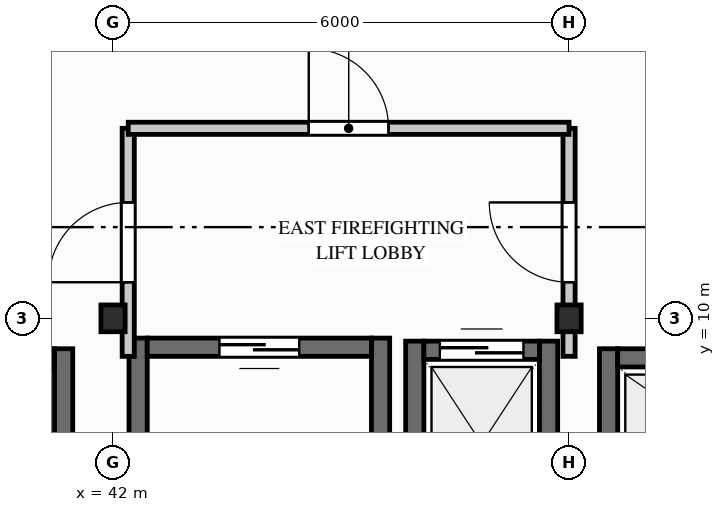
"""IFC4 building model, lengths in metres.
Left out: names, types, materials, properties, quantities, classifications, styles, units other than length and angle.
Written with IfcOpenShell. Run it as: python <this file> out.ifc"""

import sys

from ifc_helpers import new_model, si_unit, direction, frame, frame_2d, origin, origin_2d, place, context, subcontext, project, spatial, rectangle, i_section, extrude, element, fill, save


model = new_model("IFC4")
c1 = context("Model", 3, precision=1e-05, world=origin(), true_north=direction((0.0, 1.0)))
c2 = subcontext(c1, "Body", "Model", "MODEL_VIEW")
j1 = project(units=[si_unit("LENGTHUNIT", "METRE"), si_unit("PLANEANGLEUNIT", "RADIAN")], contexts=[c1])
p1 = place(None, origin())
s1 = spatial("IfcSite", under=j1, at=p1, CompositionType="ELEMENT")
p2 = place(p1, origin())
s2 = spatial("IfcBuilding", under=s1, at=p2, CompositionType="ELEMENT")
p3 = place(p2, frame((0.0, 0.0, 233.5)))
s3 = spatial("IfcBuildingStorey", under=s2, at=p3, CompositionType="ELEMENT", Elevation=233.5)
for number, where, z_axis, x_axis in (
    (1, (42.0, 10.0, 0.0), (0.0, 0.0, 1.0), (1.0, 0.0, 0.0)),
    (2, (48.0, 10.0, 0.0), (0.0, 0.0, 1.0), (1.0, 0.0, 0.0)),
):
    element("IfcColumn", number, at=place(p3, frame(where, z_axis=z_axis, x_axis=x_axis)), inside=s3, PredefinedType="COLUMN", context=c2, shape_type="SweptSolid", body=[
        extrude(i_section(OverallWidth=0.318, OverallDepth=0.353, WebThickness=0.023, FlangeThickness=0.038, FilletRadius=0.015, at=origin_2d()), origin(), (0.0, 0.0, 1.0), 3.1),
    ])
for number, where, z_axis, x_axis in (
    (3, (42.33, 2.54, 0.0), (0.0, 0.0, 1.0), (0.0, 1.0, 0.0)),
    (4, (45.52, 2.54, 0.0), (0.0, 0.0, 1.0), (0.0, 1.0, 0.0)),
):
    element("IfcWall", number, at=place(p3, frame(where, z_axis=z_axis, x_axis=x_axis)), inside=s3, PredefinedType="SHEAR", context=c2, shape_type="SweptSolid", body=[
        extrude(rectangle(XDim=7.2, YDim=0.24, at=frame_2d((3.6, 0.0))), origin(), (0.0, 0.0, 1.0), 2.89),
    ])
p4 = place(p3, frame((45.4, 9.62, 0.0), z_axis=(0.0, 0.0, 1.0), x_axis=(-1.0, 0.0, 0.0)))
e5 = element("IfcWall", 5, at=p4, inside=s3, PredefinedType="SHEAR", context=c2, shape_type="SweptSolid", body=[
    extrude(rectangle(XDim=2.95, YDim=0.24, at=frame_2d((1.475, 0.0))), origin(), (0.0, 0.0, 1.0), 2.89),
])
p5 = place(p4, frame((0.95, 0.0, 0.0)))
e6 = element("IfcOpeningElement", 6, at=p5, cuts=e5, PredefinedType="OPENING", context=c2, shape_type="SweptSolid", body=[
    extrude(rectangle(XDim=1.05, YDim=2.06, at=frame_2d((0.525, 1.03))), frame((0.0, 0.13, 0.0), z_axis=(0.0, -1.0, 0.0), x_axis=(1.0, 0.0, 0.0)), (0.0, 0.0, 1.0), 0.26),
])
for number, where, z_axis, x_axis in (
    (7, (45.97, 7.0, 0.0), (0.0, 0.0, 1.0), (0.0, 1.0, 0.0)),
    (8, (47.73, 7.0, 0.0), (0.0, 0.0, 1.0), (0.0, 1.0, 0.0)),
):
    element("IfcWall", number, at=place(p3, frame(where, z_axis=z_axis, x_axis=x_axis)), inside=s3, PredefinedType="SHEAR", context=c2, shape_type="SweptSolid", body=[
        extrude(rectangle(XDim=2.7, YDim=0.24, at=frame_2d((1.35, 0.0))), origin(), (0.0, 0.0, 1.0), 2.89),
    ])
p6 = place(p3, frame((46.09, 9.58, 0.0), z_axis=(0.0, 0.0, 1.0), x_axis=(1.0, 0.0, 0.0)))
e9 = element("IfcWall", 9, at=p6, inside=s3, PredefinedType="SHEAR", context=c2, shape_type="SweptSolid", body=[
    extrude(rectangle(XDim=1.52, YDim=0.24, at=frame_2d((0.76, 0.0))), origin(), (0.0, 0.0, 1.0), 2.89),
])
p7 = place(p6, frame((0.21, 0.0, 0.0)))
e10 = element("IfcOpeningElement", 10, at=p7, cuts=e9, PredefinedType="OPENING", context=c2, shape_type="SweptSolid", body=[
    extrude(rectangle(XDim=1.1, YDim=2.06, at=frame_2d((0.55, 1.03))), frame((0.0, 0.13, 0.0), z_axis=(0.0, -1.0, 0.0), x_axis=(1.0, 0.0, 0.0)), (0.0, 0.0, 1.0), 0.26),
])
p8 = place(p3, frame((41.35, 7.4, 0.0), z_axis=(0.0, 0.0, 1.0), x_axis=(0.0, 1.0, 0.0)))
e11 = element("IfcWall", 11, at=p8, inside=s3, PredefinedType="SHEAR", context=c2, shape_type="SweptSolid", body=[
    extrude(rectangle(XDim=2.2, YDim=0.24, at=frame_2d((1.1, 0.0))), origin(), (0.0, 0.0, 1.0), 2.89),
])
p9 = place(p3, frame((39.01, 9.48, 0.0), z_axis=(0.0, 0.0, 1.0), x_axis=(1.0, 0.0, 0.0)))
e12 = element("IfcWall", 12, at=p9, inside=s3, PredefinedType="SHEAR", context=c2, shape_type="SweptSolid", body=[
    extrude(rectangle(XDim=2.22, YDim=0.24, at=frame_2d((1.11, 0.0))), origin(), (0.0, 0.0, 1.0), 2.89),
])
p10 = place(p9, frame((0.56, 0.0, 0.0)))
e13 = element("IfcOpeningElement", 13, at=p10, cuts=e12, PredefinedType="OPENING", context=c2, shape_type="SweptSolid", body=[
    extrude(rectangle(XDim=1.1, YDim=2.06, at=frame_2d((0.55, 1.03))), frame((0.0, 0.13, 0.0), z_axis=(0.0, -1.0, 0.0), x_axis=(1.0, 0.0, 0.0)), (0.0, 0.0, 1.0), 0.26),
])
p11 = place(p3, frame((48.52, 7.6, 0.0), z_axis=(0.0, 0.0, 1.0), x_axis=(0.0, 1.0, 0.0)))
e14 = element("IfcWall", 14, at=p11, inside=s3, PredefinedType="SHEAR", context=c2, shape_type="SweptSolid", body=[
    extrude(rectangle(XDim=2.0, YDim=0.24, at=frame_2d((1.0, 0.0))), origin(), (0.0, 0.0, 1.0), 2.89),
])
p12 = place(p3, frame((48.64, 9.48, 0.0), z_axis=(0.0, 0.0, 1.0), x_axis=(1.0, 0.0, 0.0)))
e15 = element("IfcWall", 15, at=p12, inside=s3, PredefinedType="SHEAR", context=c2, shape_type="SweptSolid", body=[
    extrude(rectangle(XDim=2.12, YDim=0.24, at=frame_2d((1.06, 0.0))), origin(), (0.0, 0.0, 1.0), 2.89),
])
p13 = place(p12, frame((0.51, 0.0, 0.0)))
e16 = element("IfcOpeningElement", 16, at=p13, cuts=e15, PredefinedType="OPENING", context=c2, shape_type="SweptSolid", body=[
    extrude(rectangle(XDim=1.1, YDim=2.06, at=frame_2d((0.55, 1.03))), frame((0.0, 0.13, 0.0), z_axis=(0.0, -1.0, 0.0), x_axis=(1.0, 0.0, 0.0)), (0.0, 0.0, 1.0), 0.26),
])
p14 = place(p3, frame((42.2, 9.5, 0.0), z_axis=(0.0, 0.0, 1.0), x_axis=(0.0, 1.0, 0.0)))
e17 = element("IfcWall", 17, at=p14, inside=s3, PredefinedType="PARTITIONING", context=c2, shape_type="SweptSolid", body=[
    extrude(rectangle(XDim=3.0, YDim=0.16, at=frame_2d((1.5, 0.0))), origin(), (0.0, 0.0, 1.0), 2.325),
])
p15 = place(p14, frame((0.975, 0.0, 0.0)))
e18 = element("IfcOpeningElement", 18, at=p15, cuts=e17, PredefinedType="OPENING", context=c2, shape_type="SweptSolid", body=[
    extrude(rectangle(XDim=1.05, YDim=2.06, at=frame_2d((0.525, 1.03))), frame((0.0, 0.09, 0.0), z_axis=(0.0, -1.0, 0.0), x_axis=(1.0, 0.0, 0.0)), (0.0, 0.0, 1.0), 0.18),
])
p16 = place(p3, frame((48.0, 9.5, 0.0), z_axis=(0.0, 0.0, 1.0), x_axis=(0.0, 1.0, 0.0)))
e19 = element("IfcWall", 19, at=p16, inside=s3, PredefinedType="PARTITIONING", context=c2, shape_type="SweptSolid", body=[
    extrude(rectangle(XDim=3.0, YDim=0.16, at=frame_2d((1.5, 0.0))), origin(), (0.0, 0.0, 1.0), 2.325),
])
p17 = place(p16, frame((0.975, 0.0, 0.0)))
e20 = element("IfcOpeningElement", 20, at=p17, cuts=e19, PredefinedType="OPENING", context=c2, shape_type="SweptSolid", body=[
    extrude(rectangle(XDim=1.05, YDim=2.06, at=frame_2d((0.525, 1.03))), frame((0.0, 0.09, 0.0), z_axis=(0.0, -1.0, 0.0), x_axis=(1.0, 0.0, 0.0)), (0.0, 0.0, 1.0), 0.18),
])
p18 = place(p3, frame((42.2, 12.5, 0.0), z_axis=(0.0, 0.0, 1.0), x_axis=(1.0, 0.0, 0.0)))
e21 = element("IfcWall", 21, at=p18, inside=s3, PredefinedType="PARTITIONING", context=c2, shape_type="SweptSolid", body=[
    extrude(rectangle(XDim=5.8, YDim=0.16, at=frame_2d((2.9, 0.0))), origin(), (0.0, 0.0, 1.0), 2.325),
])
p19 = place(p18, frame((2.375, 0.0, 0.0)))
e22 = element("IfcOpeningElement", 22, at=p19, cuts=e21, PredefinedType="OPENING", context=c2, shape_type="SweptSolid", body=[
    extrude(rectangle(XDim=1.05, YDim=2.06, at=frame_2d((0.525, 1.03))), frame((0.0, 0.09, 0.0), z_axis=(0.0, -1.0, 0.0), x_axis=(1.0, 0.0, 0.0)), (0.0, 0.0, 1.0), 0.18),
])
p20 = place(p5, origin())
e23 = element("IfcDoor", 23, at=p20, inside=s3, OperationType="SINGLE_SWING_RIGHT", PredefinedType="DOOR", context=c2, shape_type="SweptSolid", body=[
    extrude(rectangle(XDim=1.05, YDim=2.06, at=frame_2d((0.525, 1.03))), frame((0.0, 0.025, 0.0), z_axis=(0.0, -1.0, 0.0), x_axis=(1.0, 0.0, 0.0)), (0.0, 0.0, 1.0), 0.05),
])
fill(e6, e23)
p21 = place(p7, origin())
e24 = element("IfcDoor", 24, at=p21, inside=s3, OperationType="SLIDING_TO_RIGHT", PredefinedType="DOOR", context=c2, shape_type="SweptSolid", body=[
    extrude(rectangle(XDim=1.1, YDim=2.06, at=frame_2d((0.55, 1.03))), frame((0.0, 0.025, 0.0), z_axis=(0.0, -1.0, 0.0), x_axis=(1.0, 0.0, 0.0)), (0.0, 0.0, 1.0), 0.05),
])
fill(e10, e24)
p22 = place(p15, origin())
e25 = element("IfcDoor", 25, at=p22, inside=s3, OperationType="SINGLE_SWING_LEFT", PredefinedType="DOOR", context=c2, shape_type="SweptSolid", body=[
    extrude(rectangle(XDim=1.05, YDim=2.06, at=frame_2d((0.525, 1.03))), frame((0.0, 0.025, 0.0), z_axis=(0.0, -1.0, 0.0), x_axis=(1.0, 0.0, 0.0)), (0.0, 0.0, 1.0), 0.05),
])
fill(e18, e25)
p23 = place(p17, origin())
e26 = element("IfcDoor", 26, at=p23, inside=s3, OperationType="SINGLE_SWING_RIGHT", PredefinedType="DOOR", context=c2, shape_type="SweptSolid", body=[
    extrude(rectangle(XDim=1.05, YDim=2.06, at=frame_2d((0.525, 1.03))), frame((0.0, 0.025, 0.0), z_axis=(0.0, -1.0, 0.0), x_axis=(1.0, 0.0, 0.0)), (0.0, 0.0, 1.0), 0.05),
])
fill(e20, e26)
p24 = place(p19, origin())
e27 = element("IfcDoor", 27, at=p24, inside=s3, OperationType="SINGLE_SWING_LEFT", PredefinedType="DOOR", context=c2, shape_type="SweptSolid", body=[
    extrude(rectangle(XDim=1.05, YDim=2.06, at=frame_2d((0.525, 1.03))), frame((0.0, 0.025, 0.0), z_axis=(0.0, -1.0, 0.0), x_axis=(1.0, 0.0, 0.0)), (0.0, 0.0, 1.0), 0.05),
])
fill(e22, e27)
save(model, sys.argv[1])
